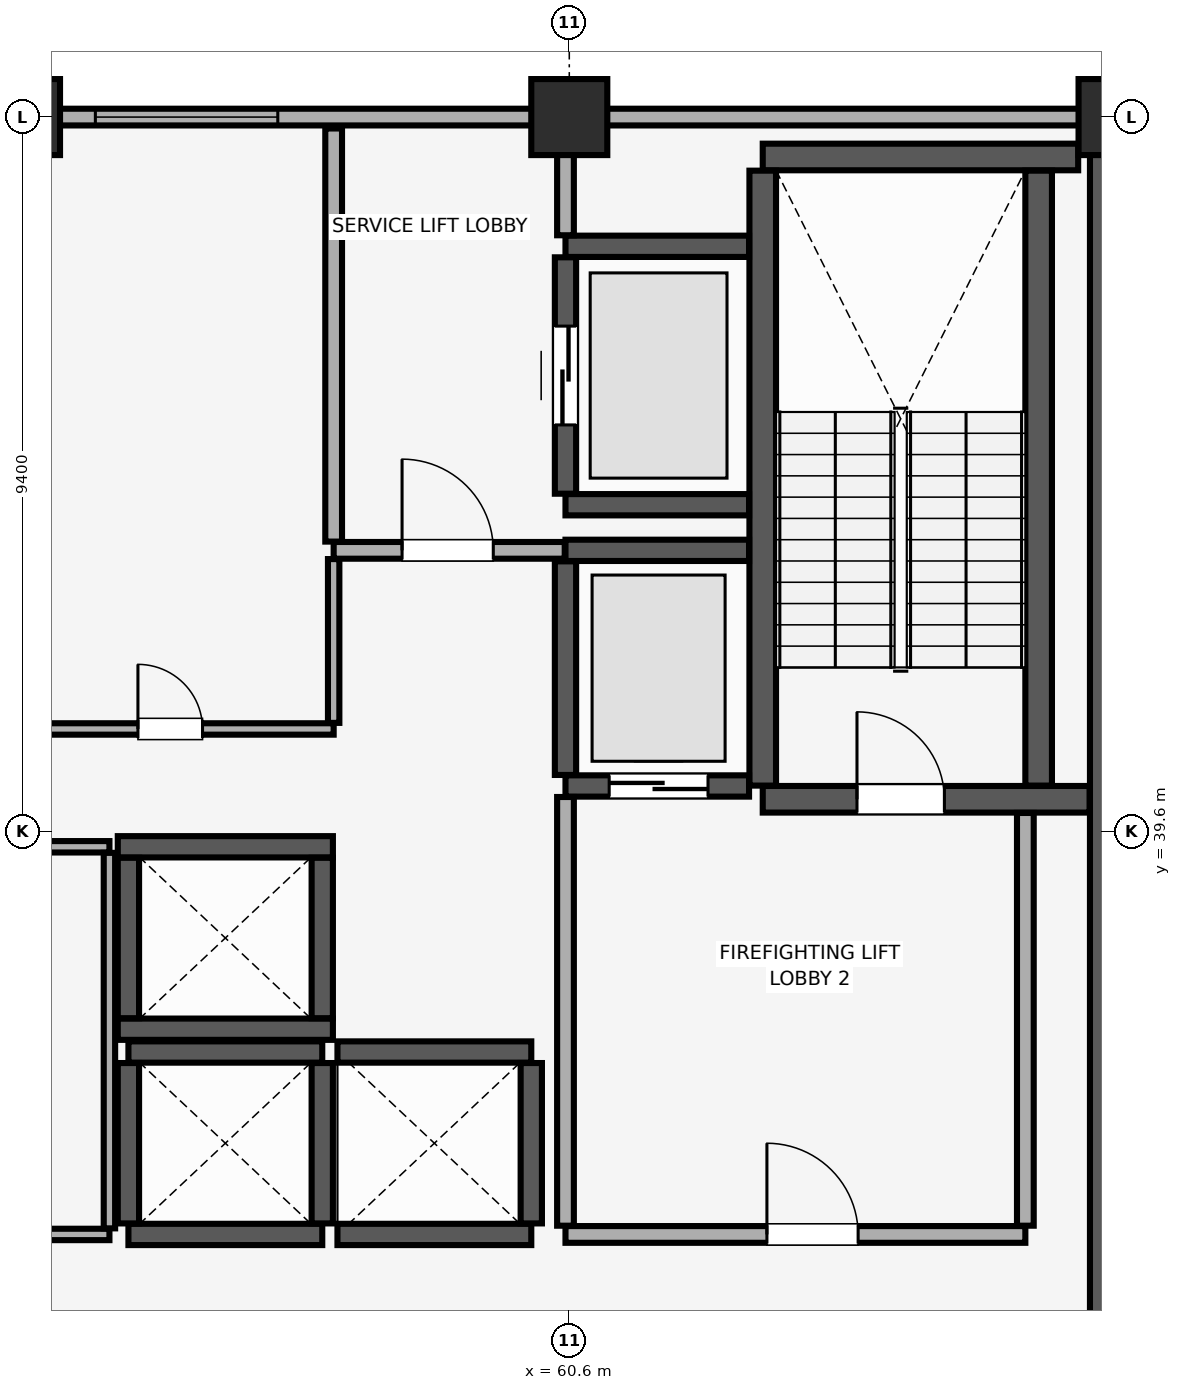
"""IFC4 building model, lengths in metres.
Left out: names, types, materials, properties, quantities, classifications, styles, units other than length and angle.
Written with IfcOpenShell. Run it as: python <this file> out.ifc"""

import sys

from ifc_helpers import new_model, si_unit, direction, frame, frame_2d, origin, origin_2d, place, context, subcontext, project, spatial, rectangle, extrude, element, fill, save


model = new_model("IFC4")
c1 = context("Model", 3, precision=1e-05, world=origin(), true_north=direction((0.0, 1.0)))
c2 = subcontext(c1, "Body", "Model", "MODEL_VIEW")
j1 = project(units=[si_unit("LENGTHUNIT", "METRE"), si_unit("PLANEANGLEUNIT", "RADIAN")], contexts=[c1])
p1 = place(None, origin())
s1 = spatial("IfcSite", under=j1, at=p1, CompositionType="ELEMENT")
p2 = place(p1, origin())
s2 = spatial("IfcBuilding", under=s1, at=p2, CompositionType="ELEMENT")
p3 = place(p2, frame((0.0, 0.0, 290.3)))
s3 = spatial("IfcBuildingStorey", under=s2, at=p3, CompositionType="ELEMENT", Elevation=290.3)
for number, where, z_axis, x_axis in (
    (1, (53.4, 49.0, 0.0), (0.0, 0.0, 1.0), (1.0, 0.0, 0.0)),
    (2, (60.6, 49.0, 0.0), (0.0, 0.0, 1.0), (1.0, 0.0, 0.0)),
    (3, (67.8, 49.0, 0.0), (0.0, 0.0, 1.0), (1.0, 0.0, 0.0)),
):
    element("IfcColumn", number, at=place(p3, frame(where, z_axis=z_axis, x_axis=x_axis)), inside=s3, PredefinedType="COLUMN", context=c2, shape_type="SweptSolid", body=[
        extrude(rectangle(XDim=1.0, YDim=1.0, at=origin_2d()), origin(), (0.0, 0.0, 1.0), 4.02),
    ])
p4 = place(p3, frame((71.4, 49.0, 0.0), z_axis=(0.0, 0.0, 1.0), x_axis=(-1.0, 0.0, 0.0)))
e4 = element("IfcWall", 4, at=p4, inside=s3, PredefinedType="SOLIDWALL", context=c2, shape_type="SweptSolid", body=[
    extrude(rectangle(XDim=58.8, YDim=0.22, at=frame_2d((29.4, 0.0))), origin(), (0.0, 0.0, 1.0), 3.22),
])
p5 = place(p4, frame((56.365, 0.0, 0.85)))
e5 = element("IfcOpeningElement", 5, at=p5, cuts=e4, PredefinedType="OPENING", context=c2, shape_type="SweptSolid", body=[
    extrude(rectangle(XDim=1.5, YDim=1.4, at=frame_2d((0.75, 0.7))), frame((0.0, 0.12, 0.0), z_axis=(0.0, -1.0, 0.0), x_axis=(1.0, 0.0, 0.0)), (0.0, 0.0, 1.0), 0.24),
])
p6 = place(p4, frame((0.935, 0.0, 0.85)))
e6 = element("IfcOpeningElement", 6, at=p6, cuts=e4, PredefinedType="OPENING", context=c2, shape_type="SweptSolid", body=[
    extrude(rectangle(XDim=1.5, YDim=1.4, at=frame_2d((0.75, 0.7))), frame((0.0, 0.12, 0.0), z_axis=(0.0, -1.0, 0.0), x_axis=(1.0, 0.0, 0.0)), (0.0, 0.0, 1.0), 0.24),
])
p7 = place(p4, frame((41.915, 0.0, 0.9)))
e7 = element("IfcOpeningElement", 7, at=p7, cuts=e4, PredefinedType="OPENING", context=c2, shape_type="SweptSolid", body=[
    extrude(rectangle(XDim=3.6, YDim=1.5, at=frame_2d((1.8, 0.75))), frame((0.0, 0.12, 0.0), z_axis=(0.0, -1.0, 0.0), x_axis=(1.0, 0.0, 0.0)), (0.0, 0.0, 1.0), 0.24),
])
p8 = place(p4, frame((35.7, 0.0, 0.9)))
e8 = element("IfcOpeningElement", 8, at=p8, cuts=e4, PredefinedType="OPENING", context=c2, shape_type="SweptSolid", body=[
    extrude(rectangle(XDim=2.4, YDim=1.5, at=frame_2d((1.2, 0.75))), frame((0.0, 0.12, 0.0), z_axis=(0.0, -1.0, 0.0), x_axis=(1.0, 0.0, 0.0)), (0.0, 0.0, 1.0), 0.24),
])
p9 = place(p4, frame((18.95, 0.0, 0.9)))
e9 = element("IfcOpeningElement", 9, at=p9, cuts=e4, PredefinedType="OPENING", context=c2, shape_type="SweptSolid", body=[
    extrude(rectangle(XDim=3.0, YDim=1.5, at=frame_2d((1.5, 0.75))), frame((0.0, 0.12, 0.0), z_axis=(0.0, -1.0, 0.0), x_axis=(1.0, 0.0, 0.0)), (0.0, 0.0, 1.0), 0.24),
])
p10 = place(p4, frame((14.635, 0.0, 0.9)))
e10 = element("IfcOpeningElement", 10, at=p10, cuts=e4, PredefinedType="OPENING", context=c2, shape_type="SweptSolid", body=[
    extrude(rectangle(XDim=2.4, YDim=1.5, at=frame_2d((1.2, 0.75))), frame((0.0, 0.12, 0.0), z_axis=(0.0, -1.0, 0.0), x_axis=(1.0, 0.0, 0.0)), (0.0, 0.0, 1.0), 0.24),
])
p11 = place(p3, frame((67.8, 29.4, 0.0), z_axis=(0.0, 0.0, 1.0), x_axis=(0.0, 1.0, 0.0)))
e11 = element("IfcWall", 11, at=p11, inside=s3, PredefinedType="SHEAR", context=c2, shape_type="SweptSolid", body=[
    extrude(rectangle(XDim=19.2, YDim=0.7, at=frame_2d((9.6, 0.0))), origin(), (0.0, 0.0, 1.0), 4.02),
])
p12 = place(p3, frame((63.145, 40.025, 0.0), z_axis=(0.0, 0.0, 1.0), x_axis=(1.0, 0.0, 0.0)))
e12 = element("IfcWall", 12, at=p12, inside=s3, PredefinedType="SHEAR", context=c2, shape_type="SweptSolid", body=[
    extrude(rectangle(XDim=4.3, YDim=0.35, at=frame_2d((2.15, 0.0))), origin(), (0.0, 0.0, 1.0), 4.02),
])
p13 = place(p12, frame((1.24, 0.0, 0.0)))
e13 = element("IfcOpeningElement", 13, at=p13, cuts=e12, PredefinedType="OPENING", context=c2, shape_type="SweptSolid", body=[
    extrude(rectangle(XDim=1.15, YDim=2.15, at=frame_2d((0.575, 1.075))), frame((0.0, 0.185, 0.0), z_axis=(0.0, -1.0, 0.0), x_axis=(1.0, 0.0, 0.0)), (0.0, 0.0, 1.0), 0.37),
])
p14 = place(p3, frame((63.145, 48.475, 0.0), z_axis=(0.0, 0.0, 1.0), x_axis=(1.0, 0.0, 0.0)))
e14 = element("IfcWall", 14, at=p14, inside=s3, PredefinedType="SHEAR", context=c2, shape_type="SweptSolid", body=[
    extrude(rectangle(XDim=4.15, YDim=0.35, at=frame_2d((2.075, 0.0))), origin(), (0.0, 0.0, 1.0), 4.02),
])
for number, where, z_axis, x_axis in (
    (15, (63.145, 40.205, 0.0), (0.0, 0.0, 1.0), (0.0, 1.0, 0.0)),
    (16, (66.775, 40.205, 0.0), (0.0, 0.0, 1.0), (0.0, 1.0, 0.0)),
):
    element("IfcWall", number, at=place(p3, frame(where, z_axis=z_axis, x_axis=x_axis)), inside=s3, PredefinedType="SHEAR", context=c2, shape_type="SweptSolid", body=[
        extrude(rectangle(XDim=8.09, YDim=0.35, at=frame_2d((4.045, 0.0))), origin(), (0.0, 0.0, 1.0), 4.02),
    ])
for number, where, z_axis, x_axis in (
    (17, (54.8, 34.3, 0.0), (0.0, 0.0, 1.0), (1.0, 0.0, 0.0)),
    (18, (54.8, 36.7, 0.0), (0.0, 0.0, 1.0), (1.0, 0.0, 0.0)),
):
    element("IfcWall", number, at=place(p3, frame(where, z_axis=z_axis, x_axis=x_axis)), inside=s3, PredefinedType="SHEAR", context=c2, shape_type="SweptSolid", body=[
        extrude(rectangle(XDim=2.55, YDim=0.28, at=frame_2d((1.275, 0.0))), origin(), (0.0, 0.0, 1.0), 4.02),
    ])
for number, where, z_axis, x_axis in (
    (19, (54.8, 34.445, 0.0), (0.0, 0.0, 1.0), (0.0, 1.0, 0.0)),
    (20, (57.35, 34.445, 0.0), (0.0, 0.0, 1.0), (0.0, 1.0, 0.0)),
):
    element("IfcWall", number, at=place(p3, frame(where, z_axis=z_axis, x_axis=x_axis)), inside=s3, PredefinedType="SHEAR", context=c2, shape_type="SweptSolid", body=[
        extrude(rectangle(XDim=2.11, YDim=0.28, at=frame_2d((1.055, 0.0))), origin(), (0.0, 0.0, 1.0), 4.02),
    ])
for number, where, z_axis, x_axis in (
    (21, (57.55, 34.3, 0.0), (0.0, 0.0, 1.0), (1.0, 0.0, 0.0)),
    (22, (57.55, 36.7, 0.0), (0.0, 0.0, 1.0), (1.0, 0.0, 0.0)),
):
    element("IfcWall", number, at=place(p3, frame(where, z_axis=z_axis, x_axis=x_axis)), inside=s3, PredefinedType="SHEAR", context=c2, shape_type="SweptSolid", body=[
        extrude(rectangle(XDim=2.55, YDim=0.28, at=frame_2d((1.275, 0.0))), origin(), (0.0, 0.0, 1.0), 4.02),
    ])
p15 = place(p3, frame((60.1, 34.445, 0.0), z_axis=(0.0, 0.0, 1.0), x_axis=(0.0, 1.0, 0.0)))
e23 = element("IfcWall", 23, at=p15, inside=s3, PredefinedType="SHEAR", context=c2, shape_type="SweptSolid", body=[
    extrude(rectangle(XDim=2.11, YDim=0.28, at=frame_2d((1.055, 0.0))), origin(), (0.0, 0.0, 1.0), 4.02),
])
for number, where, z_axis, x_axis in (
    (24, (54.66, 37.0, 0.0), (0.0, 0.0, 1.0), (1.0, 0.0, 0.0)),
    (25, (54.66, 39.4, 0.0), (0.0, 0.0, 1.0), (1.0, 0.0, 0.0)),
):
    element("IfcWall", number, at=place(p3, frame(where, z_axis=z_axis, x_axis=x_axis)), inside=s3, PredefinedType="SHEAR", context=c2, shape_type="SweptSolid", body=[
        extrude(rectangle(XDim=2.83, YDim=0.28, at=frame_2d((1.415, 0.0))), origin(), (0.0, 0.0, 1.0), 4.02),
    ])
for number, where, z_axis, x_axis in (
    (26, (54.8, 37.145, 0.0), (0.0, 0.0, 1.0), (0.0, 1.0, 0.0)),
    (27, (57.35, 37.145, 0.0), (0.0, 0.0, 1.0), (0.0, 1.0, 0.0)),
):
    element("IfcWall", number, at=place(p3, frame(where, z_axis=z_axis, x_axis=x_axis)), inside=s3, PredefinedType="SHEAR", context=c2, shape_type="SweptSolid", body=[
        extrude(rectangle(XDim=2.11, YDim=0.28, at=frame_2d((1.055, 0.0))), origin(), (0.0, 0.0, 1.0), 4.02),
    ])
p16 = place(p3, frame((60.55, 40.2, 0.0), z_axis=(0.0, 0.0, 1.0), x_axis=(1.0, 0.0, 0.0)))
e28 = element("IfcWall", 28, at=p16, inside=s3, PredefinedType="SHEAR", context=c2, shape_type="SweptSolid", body=[
    extrude(rectangle(XDim=2.415, YDim=0.28, at=frame_2d((1.208, 0.0))), origin(), (0.0, 0.0, 1.0), 4.02),
])
p17 = place(p16, frame((0.575, 0.0, 0.0)))
e29 = element("IfcOpeningElement", 29, at=p17, cuts=e28, PredefinedType="OPENING", context=c2, shape_type="SweptSolid", body=[
    extrude(rectangle(XDim=1.3, YDim=2.3, at=frame_2d((0.65, 1.15))), frame((0.0, 0.15, 0.0), z_axis=(0.0, -1.0, 0.0), x_axis=(1.0, 0.0, 0.0)), (0.0, 0.0, 1.0), 0.3),
])
p18 = place(p3, frame((60.55, 43.3, 0.0), z_axis=(0.0, 0.0, 1.0), x_axis=(1.0, 0.0, 0.0)))
e30 = element("IfcWall", 30, at=p18, inside=s3, PredefinedType="SHEAR", context=c2, shape_type="SweptSolid", body=[
    extrude(rectangle(XDim=2.415, YDim=0.28, at=frame_2d((1.208, 0.0))), origin(), (0.0, 0.0, 1.0), 4.02),
])
p19 = place(p3, frame((60.55, 40.345, 0.0), z_axis=(0.0, 0.0, 1.0), x_axis=(0.0, 1.0, 0.0)))
e31 = element("IfcWall", 31, at=p19, inside=s3, PredefinedType="SHEAR", context=c2, shape_type="SweptSolid", body=[
    extrude(rectangle(XDim=2.81, YDim=0.28, at=frame_2d((1.405, 0.0))), origin(), (0.0, 0.0, 1.0), 4.02),
])
for number, where, z_axis, x_axis in (
    (32, (60.55, 43.9, 0.0), (0.0, 0.0, 1.0), (1.0, 0.0, 0.0)),
    (33, (60.55, 47.3, 0.0), (0.0, 0.0, 1.0), (1.0, 0.0, 0.0)),
):
    element("IfcWall", number, at=place(p3, frame(where, z_axis=z_axis, x_axis=x_axis)), inside=s3, PredefinedType="SHEAR", context=c2, shape_type="SweptSolid", body=[
        extrude(rectangle(XDim=2.415, YDim=0.28, at=frame_2d((1.208, 0.0))), origin(), (0.0, 0.0, 1.0), 4.02),
    ])
p20 = place(p3, frame((60.55, 44.045, 0.0), z_axis=(0.0, 0.0, 1.0), x_axis=(0.0, 1.0, 0.0)))
e34 = element("IfcWall", 34, at=p20, inside=s3, PredefinedType="SHEAR", context=c2, shape_type="SweptSolid", body=[
    extrude(rectangle(XDim=3.11, YDim=0.28, at=frame_2d((1.555, 0.0))), origin(), (0.0, 0.0, 1.0), 4.02),
])
p21 = place(p20, frame((0.905, 0.0, 0.0)))
e35 = element("IfcOpeningElement", 35, at=p21, cuts=e34, PredefinedType="OPENING", context=c2, shape_type="SweptSolid", body=[
    extrude(rectangle(XDim=1.3, YDim=2.3, at=frame_2d((0.65, 1.15))), frame((0.0, 0.15, 0.0), z_axis=(0.0, -1.0, 0.0), x_axis=(1.0, 0.0, 0.0)), (0.0, 0.0, 1.0), 0.3),
])
p22 = place(p3, frame((60.55, 34.3, 0.0), z_axis=(0.0, 0.0, 1.0), x_axis=(1.0, 0.0, 0.0)))
e36 = element("IfcWall", 36, at=p22, inside=s3, PredefinedType="PARTITIONING", context=c2, shape_type="SweptSolid", body=[
    extrude(rectangle(XDim=6.05, YDim=0.22, at=frame_2d((3.025, 0.0))), origin(), (0.0, 0.0, 1.0), 4.02),
])
p23 = place(p22, frame((2.65, 0.0, 0.0)))
e37 = element("IfcOpeningElement", 37, at=p23, cuts=e36, PredefinedType="OPENING", context=c2, shape_type="SweptSolid", body=[
    extrude(rectangle(XDim=1.2, YDim=2.15, at=frame_2d((0.6, 1.075))), frame((0.0, 0.12, 0.0), z_axis=(0.0, -1.0, 0.0), x_axis=(1.0, 0.0, 0.0)), (0.0, 0.0, 1.0), 0.24),
])
p24 = place(p3, frame((60.55, 34.415, 0.0), z_axis=(0.0, 0.0, 1.0), x_axis=(0.0, 1.0, 0.0)))
e38 = element("IfcWall", 38, at=p24, inside=s3, PredefinedType="PARTITIONING", context=c2, shape_type="SweptSolid", body=[
    extrude(rectangle(XDim=5.64, YDim=0.22, at=frame_2d((2.82, 0.0))), origin(), (0.0, 0.0, 1.0), 4.02),
])
p25 = place(p3, frame((66.6, 34.415, 0.0), z_axis=(0.0, 0.0, 1.0), x_axis=(0.0, 1.0, 0.0)))
e39 = element("IfcWall", 39, at=p25, inside=s3, PredefinedType="PARTITIONING", context=c2, shape_type="SweptSolid", body=[
    extrude(rectangle(XDim=5.43, YDim=0.22, at=frame_2d((2.715, 0.0))), origin(), (0.0, 0.0, 1.0), 4.02),
])
p26 = place(p3, frame((57.5, 43.3, 0.0), z_axis=(0.0, 0.0, 1.0), x_axis=(1.0, 0.0, 0.0)))
e40 = element("IfcWall", 40, at=p26, inside=s3, PredefinedType="PARTITIONING", context=c2, shape_type="SweptSolid", body=[
    extrude(rectangle(XDim=3.04, YDim=0.22, at=frame_2d((1.52, 0.0))), origin(), (0.0, 0.0, 1.0), 4.02),
])
p27 = place(p26, frame((0.9, 0.0, 0.0)))
e41 = element("IfcOpeningElement", 41, at=p27, cuts=e40, PredefinedType="OPENING", context=c2, shape_type="SweptSolid", body=[
    extrude(rectangle(XDim=1.2, YDim=2.15, at=frame_2d((0.6, 1.075))), frame((0.0, 0.12, 0.0), z_axis=(0.0, -1.0, 0.0), x_axis=(1.0, 0.0, 0.0)), (0.0, 0.0, 1.0), 0.24),
])
p28 = place(p3, frame((57.5, 43.415, 0.0), z_axis=(0.0, 0.0, 1.0), x_axis=(0.0, 1.0, 0.0)))
e42 = element("IfcWall", 42, at=p28, inside=s3, PredefinedType="PARTITIONING", context=c2, shape_type="SweptSolid", body=[
    extrude(rectangle(XDim=5.435, YDim=0.22, at=frame_2d((2.718, 0.0))), origin(), (0.0, 0.0, 1.0), 4.02),
])
p29 = place(p3, frame((60.55, 47.445, 0.0), z_axis=(0.0, 0.0, 1.0), x_axis=(0.0, 1.0, 0.0)))
e43 = element("IfcWall", 43, at=p29, inside=s3, PredefinedType="PARTITIONING", context=c2, shape_type="SweptSolid", body=[
    extrude(rectangle(XDim=1.405, YDim=0.22, at=frame_2d((0.703, 0.0))), origin(), (0.0, 0.0, 1.0), 4.02),
])
p30 = place(p3, frame((46.6, 34.3, 0.0), z_axis=(0.0, 0.0, 1.0), x_axis=(1.0, 0.0, 0.0)))
e44 = element("IfcWall", 44, at=p30, inside=s3, PredefinedType="PARTITIONING", context=c2, shape_type="SweptSolid", body=[
    extrude(rectangle(XDim=7.95, YDim=0.15, at=frame_2d((3.975, 0.0))), origin(), (0.0, 0.0, 1.0), 4.02),
])
p31 = place(p30, frame((3.4, 0.0, 0.0)))
e45 = element("IfcOpeningElement", 45, at=p31, cuts=e44, PredefinedType="OPENING", context=c2, shape_type="SweptSolid", body=[
    extrude(rectangle(XDim=1.0, YDim=2.15, at=frame_2d((0.5, 1.075))), frame((0.0, 0.085, 0.0), z_axis=(0.0, -1.0, 0.0), x_axis=(1.0, 0.0, 0.0)), (0.0, 0.0, 1.0), 0.17),
])
p32 = place(p3, frame((46.6, 39.4, 0.0), z_axis=(0.0, 0.0, 1.0), x_axis=(1.0, 0.0, 0.0)))
e46 = element("IfcWall", 46, at=p32, inside=s3, PredefinedType="PARTITIONING", context=c2, shape_type="SweptSolid", body=[
    extrude(rectangle(XDim=7.95, YDim=0.15, at=frame_2d((3.975, 0.0))), origin(), (0.0, 0.0, 1.0), 4.02),
])
p33 = place(p3, frame((54.55, 34.38, 0.0), z_axis=(0.0, 0.0, 1.0), x_axis=(0.0, 1.0, 0.0)))
e47 = element("IfcWall", 47, at=p33, inside=s3, PredefinedType="PARTITIONING", context=c2, shape_type="SweptSolid", body=[
    extrude(rectangle(XDim=4.94, YDim=0.15, at=frame_2d((2.47, 0.0))), origin(), (0.0, 0.0, 1.0), 4.02),
])
p34 = place(p3, frame((53.28, 40.95, 0.0), z_axis=(0.0, 0.0, 1.0), x_axis=(1.0, 0.0, 0.0)))
e48 = element("IfcWall", 48, at=p34, inside=s3, PredefinedType="PARTITIONING", context=c2, shape_type="SweptSolid", body=[
    extrude(rectangle(XDim=4.22, YDim=0.15, at=frame_2d((2.11, 0.0))), origin(), (0.0, 0.0, 1.0), 4.02),
])
p35 = place(p34, frame((1.645, 0.0, 0.0)))
e49 = element("IfcOpeningElement", 49, at=p35, cuts=e48, PredefinedType="OPENING", context=c2, shape_type="SweptSolid", body=[
    extrude(rectangle(XDim=0.85, YDim=2.1, at=frame_2d((0.425, 1.05))), frame((0.0, 0.085, 0.0), z_axis=(0.0, -1.0, 0.0), x_axis=(1.0, 0.0, 0.0)), (0.0, 0.0, 1.0), 0.17),
])
p36 = place(p3, frame((57.5, 41.03, 0.0), z_axis=(0.0, 0.0, 1.0), x_axis=(0.0, 1.0, 0.0)))
e50 = element("IfcWall", 50, at=p36, inside=s3, PredefinedType="PARTITIONING", context=c2, shape_type="SweptSolid", body=[
    extrude(rectangle(XDim=2.155, YDim=0.15, at=frame_2d((1.078, 0.0))), origin(), (0.0, 0.0, 1.0), 4.02),
])
p37 = place(p10, origin())
e51 = element("IfcWindow", 51, at=p37, inside=s3, PartitioningType="SINGLE_PANEL", PredefinedType="WINDOW", context=c2, shape_type="SweptSolid", body=[
    extrude(rectangle(XDim=2.4, YDim=1.5, at=frame_2d((1.2, 0.75))), frame((0.0, 0.03, 0.0), z_axis=(0.0, -1.0, 0.0), x_axis=(1.0, 0.0, 0.0)), (0.0, 0.0, 1.0), 0.06),
])
fill(e10, e51)
p38 = place(p13, origin())
e52 = element("IfcDoor", 52, at=p38, inside=s3, OperationType="SINGLE_SWING_LEFT", PredefinedType="DOOR", context=c2, shape_type="SweptSolid", body=[
    extrude(rectangle(XDim=1.15, YDim=2.15, at=frame_2d((0.575, 1.075))), frame((0.0, 0.025, 0.0), z_axis=(0.0, -1.0, 0.0), x_axis=(1.0, 0.0, 0.0)), (0.0, 0.0, 1.0), 0.05),
])
fill(e13, e52)
p39 = place(p17, origin())
e53 = element("IfcDoor", 53, at=p39, inside=s3, OperationType="DOUBLE_DOOR_SLIDING", PredefinedType="DOOR", context=c2, shape_type="SweptSolid", body=[
    extrude(rectangle(XDim=1.3, YDim=2.3, at=frame_2d((0.65, 1.15))), frame((0.0, 0.025, 0.0), z_axis=(0.0, -1.0, 0.0), x_axis=(1.0, 0.0, 0.0)), (0.0, 0.0, 1.0), 0.05),
])
fill(e29, e53)
p40 = place(p21, origin())
e54 = element("IfcDoor", 54, at=p40, inside=s3, OperationType="DOUBLE_DOOR_SLIDING", PredefinedType="DOOR", context=c2, shape_type="SweptSolid", body=[
    extrude(rectangle(XDim=1.3, YDim=2.3, at=frame_2d((0.65, 1.15))), frame((0.0, 0.025, 0.0), z_axis=(0.0, -1.0, 0.0), x_axis=(1.0, 0.0, 0.0)), (0.0, 0.0, 1.0), 0.05),
])
fill(e35, e54)
p41 = place(p23, origin())
e55 = element("IfcDoor", 55, at=p41, inside=s3, OperationType="SINGLE_SWING_LEFT", PredefinedType="DOOR", context=c2, shape_type="SweptSolid", body=[
    extrude(rectangle(XDim=1.2, YDim=2.15, at=frame_2d((0.6, 1.075))), frame((0.0, 0.025, 0.0), z_axis=(0.0, -1.0, 0.0), x_axis=(1.0, 0.0, 0.0)), (0.0, 0.0, 1.0), 0.05),
])
fill(e37, e55)
p42 = place(p27, origin())
e56 = element("IfcDoor", 56, at=p42, inside=s3, OperationType="SINGLE_SWING_LEFT", PredefinedType="DOOR", context=c2, shape_type="SweptSolid", body=[
    extrude(rectangle(XDim=1.2, YDim=2.15, at=frame_2d((0.6, 1.075))), frame((0.0, 0.025, 0.0), z_axis=(0.0, -1.0, 0.0), x_axis=(1.0, 0.0, 0.0)), (0.0, 0.0, 1.0), 0.05),
])
fill(e41, e56)
p43 = place(p35, origin())
e57 = element("IfcDoor", 57, at=p43, inside=s3, OperationType="SINGLE_SWING_LEFT", PredefinedType="DOOR", context=c2, shape_type="SweptSolid", body=[
    extrude(rectangle(XDim=0.85, YDim=2.1, at=frame_2d((0.425, 1.05))), frame((0.0, 0.025, 0.0), z_axis=(0.0, -1.0, 0.0), x_axis=(1.0, 0.0, 0.0)), (0.0, 0.0, 1.0), 0.05),
])
fill(e49, e57)
save(model, sys.argv[1])
